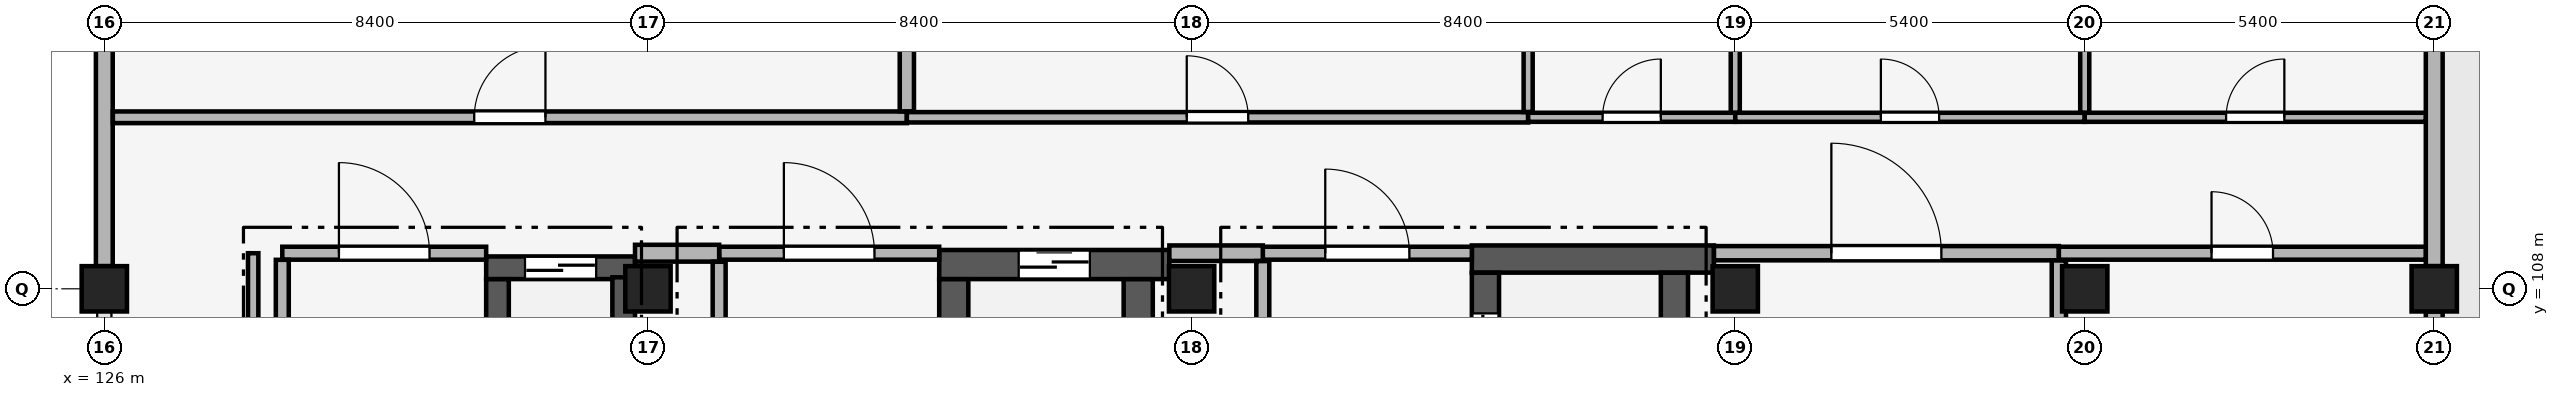
"""IFC4 building model, lengths in metres.
Left out: names, types, materials, properties, quantities, classifications, styles, units other than length and angle.
Written with IfcOpenShell. Run it as: python <this file> out.ifc"""

import sys

from ifc_helpers import new_model, si_unit, direction, frame, frame_2d, origin, origin_2d, place, context, subcontext, project, spatial, rectangle, extrude, element, fill, save


model = new_model("IFC4")
c1 = context("Model", 3, precision=1e-05, world=origin(), true_north=direction((0.0, 1.0)))
c2 = subcontext(c1, "Body", "Model", "MODEL_VIEW")
j1 = project(units=[si_unit("LENGTHUNIT", "METRE"), si_unit("PLANEANGLEUNIT", "RADIAN")], contexts=[c1])
p1 = place(None, origin())
s1 = spatial("IfcSite", under=j1, at=p1, CompositionType="ELEMENT")
p2 = place(p1, origin())
s2 = spatial("IfcBuilding", under=s1, at=p2, CompositionType="ELEMENT")
p3 = place(p2, frame((0.0, 0.0, 33.6)))
s3 = spatial("IfcBuildingStorey", under=s2, at=p3, CompositionType="ELEMENT", Elevation=33.6)
for number, where, z_axis, x_axis in (
    (1, (126.0, 108.0, 0.0), (0.0, 0.0, 1.0), (1.0, 0.0, 0.0)),
    (2, (134.4, 108.0, 0.0), (0.0, 0.0, 1.0), (1.0, 0.0, 0.0)),
    (3, (142.8, 108.0, 0.0), (0.0, 0.0, 1.0), (1.0, 0.0, 0.0)),
    (4, (151.2, 108.0, 0.0), (0.0, 0.0, 1.0), (1.0, 0.0, 0.0)),
    (5, (156.6, 108.0, 0.0), (0.0, 0.0, 1.0), (1.0, 0.0, 0.0)),
    (6, (162.0, 108.0, 0.0), (0.0, 0.0, 1.0), (1.0, 0.0, 0.0)),
):
    element("IfcColumn", number, at=place(p3, frame(where, z_axis=z_axis, x_axis=x_axis)), inside=s3, PredefinedType="COLUMN", context=c2, shape_type="SweptSolid", body=[
        extrude(rectangle(XDim=0.7, YDim=0.7, at=origin_2d()), origin(), (0.0, 0.0, 1.0), 4.2),
    ])
for number, where, z_axis, x_axis in (
    (7, (126.0, 108.35, 0.0), (0.0, 0.0, 1.0), (0.0, 1.0, 0.0)),
    (8, (162.0, 113.05, 0.0), (0.0, 0.0, 1.0), (0.0, -1.0, 0.0)),
):
    element("IfcWall", number, at=place(p3, frame(where, z_axis=z_axis, x_axis=x_axis)), inside=s3, PredefinedType="SOLIDWALL", context=c2, shape_type="SweptSolid", body=[
        extrude(rectangle(XDim=4.7, YDim=0.26, at=frame_2d((2.35, 0.0))), origin(), (0.0, 0.0, 1.0), 3.4),
    ])
p4 = place(p3, frame((162.0, 107.65, 0.0), z_axis=(0.0, 0.0, 1.0), x_axis=(0.0, -1.0, 0.0)))
e9 = element("IfcWall", 9, at=p4, inside=s3, PredefinedType="SOLIDWALL", context=c2, shape_type="SweptSolid", body=[
    extrude(rectangle(XDim=7.7, YDim=0.26, at=frame_2d((3.85, 0.0))), origin(), (0.0, 0.0, 1.0), 3.25),
])
p5 = place(p4, frame((2.95, 0.0, 0.0)))
e10 = element("IfcOpeningElement", 10, at=p5, cuts=e9, PredefinedType="OPENING", context=c2, shape_type="SweptSolid", body=[
    extrude(rectangle(XDim=1.8, YDim=2.2, at=frame_2d((0.9, 1.1))), frame((0.0, 0.145, 0.0), z_axis=(0.0, -1.0, 0.0), x_axis=(1.0, 0.0, 0.0)), (0.0, 0.0, 1.0), 0.29),
])
p6 = place(p3, frame((131.9, 108.325, 0.0), z_axis=(0.0, 0.0, 1.0), x_axis=(1.0, 0.0, 0.0)))
e11 = element("IfcWall", 11, at=p6, inside=s3, PredefinedType="SHEAR", context=c2, shape_type="SweptSolid", body=[
    extrude(rectangle(XDim=2.3, YDim=0.35, at=frame_2d((1.15, 0.0))), origin(), (0.0, 0.0, 1.0), 3.95),
])
p7 = place(p6, frame((0.6, 0.0, 0.0)))
e12 = element("IfcOpeningElement", 12, at=p7, cuts=e11, PredefinedType="OPENING", context=c2, shape_type="SweptSolid", body=[
    extrude(rectangle(XDim=1.1, YDim=2.15, at=frame_2d((0.55, 1.075))), frame((0.0, 0.19, 0.0), z_axis=(0.0, -1.0, 0.0), x_axis=(1.0, 0.0, 0.0)), (0.0, 0.0, 1.0), 0.38),
])
p8 = place(p3, frame((132.075, 106.093, 0.0), z_axis=(0.0, 0.0, 1.0), x_axis=(0.0, 1.0, 0.0)))
e13 = element("IfcWall", 13, at=p8, inside=s3, PredefinedType="SHEAR", context=c2, shape_type="SweptSolid", body=[
    extrude(rectangle(XDim=2.055, YDim=0.35, at=frame_2d((1.027, 0.0))), origin(), (0.0, 0.0, 1.0), 3.95),
])
p9 = place(p3, frame((134.025, 106.093, 0.0), z_axis=(0.0, 0.0, 1.0), x_axis=(0.0, 1.0, 0.0)))
e14 = element("IfcWall", 14, at=p9, inside=s3, PredefinedType="SHEAR", context=c2, shape_type="SweptSolid", body=[
    extrude(rectangle(XDim=2.085, YDim=0.35, at=frame_2d((1.042, 0.0))), origin(), (0.0, 0.0, 1.0), 3.95),
])
p10 = place(p3, frame((138.9, 108.375, 0.0), z_axis=(0.0, 0.0, 1.0), x_axis=(1.0, 0.0, 0.0)))
e15 = element("IfcWall", 15, at=p10, inside=s3, PredefinedType="SHEAR", context=c2, shape_type="SweptSolid", body=[
    extrude(rectangle(XDim=3.556, YDim=0.45, at=frame_2d((1.778, 0.0))), origin(), (0.0, 0.0, 1.0), 3.95),
])
p11 = place(p10, frame((1.228, 0.0, 0.0)))
e16 = element("IfcOpeningElement", 16, at=p11, cuts=e15, PredefinedType="OPENING", context=c2, shape_type="SweptSolid", body=[
    extrude(rectangle(XDim=1.1, YDim=2.15, at=frame_2d((0.55, 1.075))), frame((0.0, 0.24, 0.0), z_axis=(0.0, -1.0, 0.0), x_axis=(1.0, 0.0, 0.0)), (0.0, 0.0, 1.0), 0.48),
])
for number, where, z_axis, x_axis in (
    (17, (139.125, 106.093, 0.0), (0.0, 0.0, 1.0), (0.0, 1.0, 0.0)),
    (18, (141.975, 106.093, 0.0), (0.0, 0.0, 1.0), (0.0, 1.0, 0.0)),
):
    element("IfcWall", number, at=place(p3, frame(where, z_axis=z_axis, x_axis=x_axis)), inside=s3, PredefinedType="SHEAR", context=c2, shape_type="SweptSolid", body=[
        extrude(rectangle(XDim=2.055, YDim=0.45, at=frame_2d((1.027, 0.0))), origin(), (0.0, 0.0, 1.0), 3.95),
    ])
p12 = place(p3, frame((147.13, 108.46, 0.0), z_axis=(0.0, 0.0, 1.0), x_axis=(1.0, 0.0, 0.0)))
e19 = element("IfcWall", 19, at=p12, inside=s3, PredefinedType="SHEAR", context=c2, shape_type="SweptSolid", body=[
    extrude(rectangle(XDim=3.741, YDim=0.42, at=frame_2d((1.871, 0.0))), origin(), (0.0, 0.0, 1.0), 3.95),
])
p13 = place(p3, frame((147.34, 105.793, 0.0), z_axis=(0.0, 0.0, 1.0), x_axis=(0.0, 1.0, 0.0)))
e20 = element("IfcWall", 20, at=p13, inside=s3, PredefinedType="SHEAR", context=c2, shape_type="SweptSolid", body=[
    extrude(rectangle(XDim=2.455, YDim=0.42, at=frame_2d((1.228, 0.0))), origin(), (0.0, 0.0, 1.0), 3.95),
])
p14 = place(p13, frame((0.627, 0.0, 0.0)))
e21 = element("IfcOpeningElement", 21, at=p14, cuts=e20, PredefinedType="OPENING", context=c2, shape_type="SweptSolid", body=[
    extrude(rectangle(XDim=1.2, YDim=2.15, at=frame_2d((0.6, 1.075))), frame((0.0, 0.225, 0.0), z_axis=(0.0, -1.0, 0.0), x_axis=(1.0, 0.0, 0.0)), (0.0, 0.0, 1.0), 0.45),
])
p15 = place(p3, frame((150.26, 105.793, 0.0), z_axis=(0.0, 0.0, 1.0), x_axis=(0.0, 1.0, 0.0)))
e22 = element("IfcWall", 22, at=p15, inside=s3, PredefinedType="SHEAR", context=c2, shape_type="SweptSolid", body=[
    extrude(rectangle(XDim=2.455, YDim=0.42, at=frame_2d((1.228, 0.0))), origin(), (0.0, 0.0, 1.0), 3.95),
])
p16 = place(p3, frame((128.75, 108.55, 0.0), z_axis=(0.0, 0.0, 1.0), x_axis=(1.0, 0.0, 0.0)))
e23 = element("IfcWall", 23, at=p16, inside=s3, PredefinedType="PARTITIONING", context=c2, shape_type="SweptSolid", body=[
    extrude(rectangle(XDim=3.15, YDim=0.2, at=frame_2d((1.575, 0.0))), origin(), (0.0, 0.0, 1.0), 3.95),
])
p17 = place(p16, frame((0.875, 0.0, 0.0)))
e24 = element("IfcOpeningElement", 24, at=p17, cuts=e23, PredefinedType="OPENING", context=c2, shape_type="SweptSolid", body=[
    extrude(rectangle(XDim=1.4, YDim=2.2, at=frame_2d((0.7, 1.1))), frame((0.0, 0.115, 0.0), z_axis=(0.0, -1.0, 0.0), x_axis=(1.0, 0.0, 0.0)), (0.0, 0.0, 1.0), 0.23),
])
p18 = place(p3, frame((135.5, 108.55, 0.0), z_axis=(0.0, 0.0, 1.0), x_axis=(1.0, 0.0, 0.0)))
e25 = element("IfcWall", 25, at=p18, inside=s3, PredefinedType="PARTITIONING", context=c2, shape_type="SweptSolid", body=[
    extrude(rectangle(XDim=3.4, YDim=0.2, at=frame_2d((1.7, 0.0))), origin(), (0.0, 0.0, 1.0), 3.95),
])
p19 = place(p18, frame((1.0, 0.0, 0.0)))
e26 = element("IfcOpeningElement", 26, at=p19, cuts=e25, PredefinedType="OPENING", context=c2, shape_type="SweptSolid", body=[
    extrude(rectangle(XDim=1.4, YDim=2.2, at=frame_2d((0.7, 1.1))), frame((0.0, 0.115, 0.0), z_axis=(0.0, -1.0, 0.0), x_axis=(1.0, 0.0, 0.0)), (0.0, 0.0, 1.0), 0.23),
])
p20 = place(p3, frame((143.9, 108.55, 0.0), z_axis=(0.0, 0.0, 1.0), x_axis=(1.0, 0.0, 0.0)))
e27 = element("IfcWall", 27, at=p20, inside=s3, PredefinedType="PARTITIONING", context=c2, shape_type="SweptSolid", body=[
    extrude(rectangle(XDim=3.23, YDim=0.2, at=frame_2d((1.615, 0.0))), origin(), (0.0, 0.0, 1.0), 3.95),
])
p21 = place(p20, frame((0.965, 0.0, 0.0)))
e28 = element("IfcOpeningElement", 28, at=p21, cuts=e27, PredefinedType="OPENING", context=c2, shape_type="SweptSolid", body=[
    extrude(rectangle(XDim=1.3, YDim=2.2, at=frame_2d((0.65, 1.1))), frame((0.0, 0.115, 0.0), z_axis=(0.0, -1.0, 0.0), x_axis=(1.0, 0.0, 0.0)), (0.0, 0.0, 1.0), 0.23),
])
p22 = place(p3, frame((134.2, 108.55, 0.0), z_axis=(0.0, 0.0, 1.0), x_axis=(1.0, 0.0, 0.0)))
e29 = element("IfcWall", 29, at=p22, inside=s3, PredefinedType="PARTITIONING", context=c2, shape_type="SweptSolid", body=[
    extrude(rectangle(XDim=1.3, YDim=0.26, at=frame_2d((0.65, 0.0))), origin(), (0.0, 0.0, 1.0), 3.4),
])
p23 = place(p3, frame((142.456, 108.55, 0.0), z_axis=(0.0, 0.0, 1.0), x_axis=(1.0, 0.0, 0.0)))
e30 = element("IfcWall", 30, at=p23, inside=s3, PredefinedType="PARTITIONING", context=c2, shape_type="SweptSolid", body=[
    extrude(rectangle(XDim=1.444, YDim=0.24, at=frame_2d((0.722, 0.0))), origin(), (0.0, 0.0, 1.0), 3.4),
])
p24 = place(p3, frame((150.871, 108.55, 0.0), z_axis=(0.0, 0.0, 1.0), x_axis=(1.0, 0.0, 0.0)))
e31 = element("IfcWall", 31, at=p24, inside=s3, PredefinedType="PARTITIONING", context=c2, shape_type="SweptSolid", body=[
    extrude(rectangle(XDim=5.329, YDim=0.22, at=frame_2d((2.665, 0.0))), origin(), (0.0, 0.0, 1.0), 3.4),
])
p25 = place(p24, frame((1.814, 0.0, 0.0)))
e32 = element("IfcOpeningElement", 32, at=p25, cuts=e31, PredefinedType="OPENING", context=c2, shape_type="SweptSolid", body=[
    extrude(rectangle(XDim=1.7, YDim=2.35, at=frame_2d((0.85, 1.175))), frame((0.0, 0.125, 0.0), z_axis=(0.0, -1.0, 0.0), x_axis=(1.0, 0.0, 0.0)), (0.0, 0.0, 1.0), 0.25),
])
p26 = place(p3, frame((156.2, 108.55, 0.0), z_axis=(0.0, 0.0, 1.0), x_axis=(1.0, 0.0, 0.0)))
e33 = element("IfcWall", 33, at=p26, inside=s3, PredefinedType="PARTITIONING", context=c2, shape_type="SweptSolid", body=[
    extrude(rectangle(XDim=5.668, YDim=0.2, at=frame_2d((2.834, 0.0))), origin(), (0.0, 0.0, 1.0), 3.4),
])
p27 = place(p26, frame((2.359, 0.0, 0.0)))
e34 = element("IfcOpeningElement", 34, at=p27, cuts=e33, PredefinedType="OPENING", context=c2, shape_type="SweptSolid", body=[
    extrude(rectangle(XDim=0.95, YDim=2.2, at=frame_2d((0.475, 1.1))), frame((0.0, 0.115, 0.0), z_axis=(0.0, -1.0, 0.0), x_axis=(1.0, 0.0, 0.0)), (0.0, 0.0, 1.0), 0.23),
])
p28 = place(p3, frame((126.132, 110.65, 0.0), z_axis=(0.0, 0.0, 1.0), x_axis=(1.0, 0.0, 0.0)))
e35 = element("IfcWall", 35, at=p28, inside=s3, PredefinedType="PARTITIONING", context=c2, shape_type="SweptSolid", body=[
    extrude(rectangle(XDim=12.268, YDim=0.18, at=frame_2d((6.134, 0.0))), origin(), (0.0, 0.0, 1.0), 3.4),
])
p29 = place(p28, frame((5.584, 0.0, 0.0)))
e36 = element("IfcOpeningElement", 36, at=p29, cuts=e35, PredefinedType="OPENING", context=c2, shape_type="SweptSolid", body=[
    extrude(rectangle(XDim=1.1, YDim=2.2, at=frame_2d((0.55, 1.1))), frame((0.0, 0.105, 0.0), z_axis=(0.0, -1.0, 0.0), x_axis=(1.0, 0.0, 0.0)), (0.0, 0.0, 1.0), 0.21),
])
p30 = place(p3, frame((138.4, 110.65, 0.0), z_axis=(0.0, 0.0, 1.0), x_axis=(1.0, 0.0, 0.0)))
e37 = element("IfcWall", 37, at=p30, inside=s3, PredefinedType="PARTITIONING", context=c2, shape_type="SweptSolid", body=[
    extrude(rectangle(XDim=9.6, YDim=0.16, at=frame_2d((4.8, 0.0))), origin(), (0.0, 0.0, 1.0), 3.4),
])
p31 = place(p30, frame((4.325, 0.0, 0.0)))
e38 = element("IfcOpeningElement", 38, at=p31, cuts=e37, PredefinedType="OPENING", context=c2, shape_type="SweptSolid", body=[
    extrude(rectangle(XDim=0.95, YDim=2.1, at=frame_2d((0.475, 1.05))), frame((0.0, 0.095, 0.0), z_axis=(0.0, -1.0, 0.0), x_axis=(1.0, 0.0, 0.0)), (0.0, 0.0, 1.0), 0.19),
])
p32 = place(p3, frame((148.0, 110.65, 0.0), z_axis=(0.0, 0.0, 1.0), x_axis=(1.0, 0.0, 0.0)))
e39 = element("IfcWall", 39, at=p32, inside=s3, PredefinedType="PARTITIONING", context=c2, shape_type="SweptSolid", body=[
    extrude(rectangle(XDim=3.2, YDim=0.14, at=frame_2d((1.6, 0.0))), origin(), (0.0, 0.0, 1.0), 3.4),
])
p33 = place(p32, frame((1.15, 0.0, 0.0)))
e40 = element("IfcOpeningElement", 40, at=p33, cuts=e39, PredefinedType="OPENING", context=c2, shape_type="SweptSolid", body=[
    extrude(rectangle(XDim=0.9, YDim=2.1, at=frame_2d((0.45, 1.05))), frame((0.0, 0.085, 0.0), z_axis=(0.0, -1.0, 0.0), x_axis=(1.0, 0.0, 0.0)), (0.0, 0.0, 1.0), 0.17),
])
p34 = place(p3, frame((151.2, 110.65, 0.0), z_axis=(0.0, 0.0, 1.0), x_axis=(1.0, 0.0, 0.0)))
e41 = element("IfcWall", 41, at=p34, inside=s3, PredefinedType="PARTITIONING", context=c2, shape_type="SweptSolid", body=[
    extrude(rectangle(XDim=5.4, YDim=0.14, at=frame_2d((2.7, 0.0))), origin(), (0.0, 0.0, 1.0), 3.4),
])
p35 = place(p34, frame((2.25, 0.0, 0.0)))
e42 = element("IfcOpeningElement", 42, at=p35, cuts=e41, PredefinedType="OPENING", context=c2, shape_type="SweptSolid", body=[
    extrude(rectangle(XDim=0.9, YDim=2.1, at=frame_2d((0.45, 1.05))), frame((0.0, 0.085, 0.0), z_axis=(0.0, -1.0, 0.0), x_axis=(1.0, 0.0, 0.0)), (0.0, 0.0, 1.0), 0.17),
])
p36 = place(p3, frame((156.6, 110.65, 0.0), z_axis=(0.0, 0.0, 1.0), x_axis=(1.0, 0.0, 0.0)))
e43 = element("IfcWall", 43, at=p36, inside=s3, PredefinedType="PARTITIONING", context=c2, shape_type="SweptSolid", body=[
    extrude(rectangle(XDim=5.268, YDim=0.14, at=frame_2d((2.634, 0.0))), origin(), (0.0, 0.0, 1.0), 3.4),
])
p37 = place(p36, frame((2.184, 0.0, 0.0)))
e44 = element("IfcOpeningElement", 44, at=p37, cuts=e43, PredefinedType="OPENING", context=c2, shape_type="SweptSolid", body=[
    extrude(rectangle(XDim=0.9, YDim=2.1, at=frame_2d((0.45, 1.05))), frame((0.0, 0.085, 0.0), z_axis=(0.0, -1.0, 0.0), x_axis=(1.0, 0.0, 0.0)), (0.0, 0.0, 1.0), 0.17),
])
p38 = place(p3, frame((128.3, 103.248, 0.0), z_axis=(0.0, 0.0, 1.0), x_axis=(0.0, 1.0, 0.0)))
e45 = element("IfcWall", 45, at=p38, inside=s3, PredefinedType="PARTITIONING", context=c2, shape_type="SweptSolid", body=[
    extrude(rectangle(XDim=5.302, YDim=0.16, at=frame_2d((2.651, 0.0))), origin(), (0.0, 0.0, 1.0), 3.95),
])
p39 = place(p3, frame((128.75, 103.602, 0.0), z_axis=(0.0, 0.0, 1.0), x_axis=(0.0, 1.0, 0.0)))
e46 = element("IfcWall", 46, at=p39, inside=s3, PredefinedType="PARTITIONING", context=c2, shape_type="SweptSolid", body=[
    extrude(rectangle(XDim=4.846, YDim=0.2, at=frame_2d((2.423, 0.0))), origin(), (0.0, 0.0, 1.0), 3.95),
])
p40 = place(p3, frame((135.5, 103.702, 0.0), z_axis=(0.0, 0.0, 1.0), x_axis=(0.0, 1.0, 0.0)))
e47 = element("IfcWall", 47, at=p40, inside=s3, PredefinedType="PARTITIONING", context=c2, shape_type="SweptSolid", body=[
    extrude(rectangle(XDim=4.716, YDim=0.2, at=frame_2d((2.358, 0.0))), origin(), (0.0, 0.0, 1.0), 3.95),
])
p41 = place(p3, frame((138.4, 110.742, 0.0), z_axis=(0.0, 0.0, 1.0), x_axis=(0.0, 1.0, 0.0)))
e48 = element("IfcWall", 48, at=p41, inside=s3, PredefinedType="PARTITIONING", context=c2, shape_type="SweptSolid", body=[
    extrude(rectangle(XDim=7.926, YDim=0.22, at=frame_2d((3.963, 0.0))), origin(), (0.0, 0.0, 1.0), 3.25),
])
p42 = place(p3, frame((143.9, 103.672, 0.0), z_axis=(0.0, 0.0, 1.0), x_axis=(0.0, 1.0, 0.0)))
e49 = element("IfcWall", 49, at=p42, inside=s3, PredefinedType="PARTITIONING", context=c2, shape_type="SweptSolid", body=[
    extrude(rectangle(XDim=4.756, YDim=0.2, at=frame_2d((2.378, 0.0))), origin(), (0.0, 0.0, 1.0), 3.95),
])
p43 = place(p3, frame((148.0, 110.732, 0.0), z_axis=(0.0, 0.0, 1.0), x_axis=(0.0, 1.0, 0.0)))
e50 = element("IfcWall", 50, at=p43, inside=s3, PredefinedType="PARTITIONING", context=c2, shape_type="SweptSolid", body=[
    extrude(rectangle(XDim=7.936, YDim=0.14, at=frame_2d((3.968, 0.0))), origin(), (0.0, 0.0, 1.0), 3.25),
])
p44 = place(p3, frame((151.2, 110.722, 0.0), z_axis=(0.0, 0.0, 1.0), x_axis=(0.0, 1.0, 0.0)))
e51 = element("IfcWall", 51, at=p44, inside=s3, PredefinedType="PARTITIONING", context=c2, shape_type="SweptSolid", body=[
    extrude(rectangle(XDim=8.156, YDim=0.14, at=frame_2d((4.078, 0.0))), origin(), (0.0, 0.0, 1.0), 3.4),
])
p45 = place(p3, frame((156.2, 93.732, 0.0), z_axis=(0.0, 0.0, 1.0), x_axis=(0.0, 1.0, 0.0)))
e52 = element("IfcWall", 52, at=p45, inside=s3, PredefinedType="PARTITIONING", context=c2, shape_type="SweptSolid", body=[
    extrude(rectangle(XDim=14.706, YDim=0.22, at=frame_2d((7.353, 0.0))), origin(), (0.0, 0.0, 1.0), 3.35),
])
p46 = place(p3, frame((156.6, 110.722, 0.0), z_axis=(0.0, 0.0, 1.0), x_axis=(0.0, 1.0, 0.0)))
e53 = element("IfcWall", 53, at=p46, inside=s3, PredefinedType="PARTITIONING", context=c2, shape_type="SweptSolid", body=[
    extrude(rectangle(XDim=8.176, YDim=0.14, at=frame_2d((4.088, 0.0))), origin(), (0.0, 0.0, 1.0), 3.4),
])
p47 = place(p7, origin())
e54 = element("IfcDoor", 54, at=p47, inside=s3, OperationType="DOUBLE_DOOR_SLIDING", PredefinedType="DOOR", context=c2, shape_type="SweptSolid", body=[
    extrude(rectangle(XDim=1.1, YDim=2.15, at=frame_2d((0.55, 1.075))), frame((0.0, 0.025, 0.0), z_axis=(0.0, -1.0, 0.0), x_axis=(1.0, 0.0, 0.0)), (0.0, 0.0, 1.0), 0.05),
])
fill(e12, e54)
p48 = place(p11, origin())
e55 = element("IfcDoor", 55, at=p48, inside=s3, OperationType="DOUBLE_DOOR_SLIDING", PredefinedType="DOOR", context=c2, shape_type="SweptSolid", body=[
    extrude(rectangle(XDim=1.1, YDim=2.15, at=frame_2d((0.55, 1.075))), frame((0.0, 0.025, 0.0), z_axis=(0.0, -1.0, 0.0), x_axis=(1.0, 0.0, 0.0)), (0.0, 0.0, 1.0), 0.05),
])
fill(e16, e55)
p49 = place(p14, origin())
e56 = element("IfcDoor", 56, at=p49, inside=s3, OperationType="DOUBLE_DOOR_SLIDING", PredefinedType="DOOR", context=c2, shape_type="SweptSolid", body=[
    extrude(rectangle(XDim=1.2, YDim=2.15, at=frame_2d((0.6, 1.075))), frame((0.0, 0.025, 0.0), z_axis=(0.0, -1.0, 0.0), x_axis=(1.0, 0.0, 0.0)), (0.0, 0.0, 1.0), 0.05),
])
fill(e21, e56)
p50 = place(p17, origin())
e57 = element("IfcDoor", 57, at=p50, inside=s3, OperationType="SINGLE_SWING_LEFT", PredefinedType="DOOR", context=c2, shape_type="SweptSolid", body=[
    extrude(rectangle(XDim=1.4, YDim=2.2, at=frame_2d((0.7, 1.1))), frame((0.0, 0.025, 0.0), z_axis=(0.0, -1.0, 0.0), x_axis=(1.0, 0.0, 0.0)), (0.0, 0.0, 1.0), 0.05),
])
fill(e24, e57)
p51 = place(p19, origin())
e58 = element("IfcDoor", 58, at=p51, inside=s3, OperationType="SINGLE_SWING_LEFT", PredefinedType="DOOR", context=c2, shape_type="SweptSolid", body=[
    extrude(rectangle(XDim=1.4, YDim=2.2, at=frame_2d((0.7, 1.1))), frame((0.0, 0.025, 0.0), z_axis=(0.0, -1.0, 0.0), x_axis=(1.0, 0.0, 0.0)), (0.0, 0.0, 1.0), 0.05),
])
fill(e26, e58)
p52 = place(p21, origin())
e59 = element("IfcDoor", 59, at=p52, inside=s3, OperationType="SINGLE_SWING_LEFT", PredefinedType="DOOR", context=c2, shape_type="SweptSolid", body=[
    extrude(rectangle(XDim=1.3, YDim=2.2, at=frame_2d((0.65, 1.1))), frame((0.0, 0.025, 0.0), z_axis=(0.0, -1.0, 0.0), x_axis=(1.0, 0.0, 0.0)), (0.0, 0.0, 1.0), 0.05),
])
fill(e28, e59)
p53 = place(p29, origin())
e60 = element("IfcDoor", 60, at=p53, inside=s3, OperationType="SINGLE_SWING_RIGHT", PredefinedType="DOOR", context=c2, shape_type="SweptSolid", body=[
    extrude(rectangle(XDim=1.1, YDim=2.2, at=frame_2d((0.55, 1.1))), frame((0.0, 0.025, 0.0), z_axis=(0.0, -1.0, 0.0), x_axis=(1.0, 0.0, 0.0)), (0.0, 0.0, 1.0), 0.05),
])
fill(e36, e60)
p54 = place(p31, origin())
e61 = element("IfcDoor", 61, at=p54, inside=s3, OperationType="SINGLE_SWING_LEFT", PredefinedType="DOOR", context=c2, shape_type="SweptSolid", body=[
    extrude(rectangle(XDim=0.95, YDim=2.1, at=frame_2d((0.475, 1.05))), frame((0.0, 0.025, 0.0), z_axis=(0.0, -1.0, 0.0), x_axis=(1.0, 0.0, 0.0)), (0.0, 0.0, 1.0), 0.05),
])
fill(e38, e61)
p55 = place(p33, origin())
e62 = element("IfcDoor", 62, at=p55, inside=s3, OperationType="SINGLE_SWING_RIGHT", PredefinedType="DOOR", context=c2, shape_type="SweptSolid", body=[
    extrude(rectangle(XDim=0.9, YDim=2.1, at=frame_2d((0.45, 1.05))), frame((0.0, 0.025, 0.0), z_axis=(0.0, -1.0, 0.0), x_axis=(1.0, 0.0, 0.0)), (0.0, 0.0, 1.0), 0.05),
])
fill(e40, e62)
p56 = place(p35, origin())
e63 = element("IfcDoor", 63, at=p56, inside=s3, OperationType="SINGLE_SWING_LEFT", PredefinedType="DOOR", context=c2, shape_type="SweptSolid", body=[
    extrude(rectangle(XDim=0.9, YDim=2.1, at=frame_2d((0.45, 1.05))), frame((0.0, 0.025, 0.0), z_axis=(0.0, -1.0, 0.0), x_axis=(1.0, 0.0, 0.0)), (0.0, 0.0, 1.0), 0.05),
])
fill(e42, e63)
p57 = place(p37, origin())
e64 = element("IfcDoor", 64, at=p57, inside=s3, OperationType="SINGLE_SWING_RIGHT", PredefinedType="DOOR", context=c2, shape_type="SweptSolid", body=[
    extrude(rectangle(XDim=0.9, YDim=2.1, at=frame_2d((0.45, 1.05))), frame((0.0, 0.025, 0.0), z_axis=(0.0, -1.0, 0.0), x_axis=(1.0, 0.0, 0.0)), (0.0, 0.0, 1.0), 0.05),
])
fill(e44, e64)
p58 = place(p25, origin())
e65 = element("IfcDoor", 65, at=p58, inside=s3, OperationType="SINGLE_SWING_LEFT", PredefinedType="DOOR", context=c2, shape_type="SweptSolid", body=[
    extrude(rectangle(XDim=1.7, YDim=2.35, at=frame_2d((0.85, 1.175))), frame((0.0, 0.025, 0.0), z_axis=(0.0, -1.0, 0.0), x_axis=(1.0, 0.0, 0.0)), (0.0, 0.0, 1.0), 0.05),
])
fill(e32, e65)
p59 = place(p27, origin())
e66 = element("IfcDoor", 66, at=p59, inside=s3, OperationType="SINGLE_SWING_LEFT", PredefinedType="DOOR", context=c2, shape_type="SweptSolid", body=[
    extrude(rectangle(XDim=0.95, YDim=2.2, at=frame_2d((0.475, 1.1))), frame((0.0, 0.025, 0.0), z_axis=(0.0, -1.0, 0.0), x_axis=(1.0, 0.0, 0.0)), (0.0, 0.0, 1.0), 0.05),
])
fill(e34, e66)
save(model, sys.argv[1])
